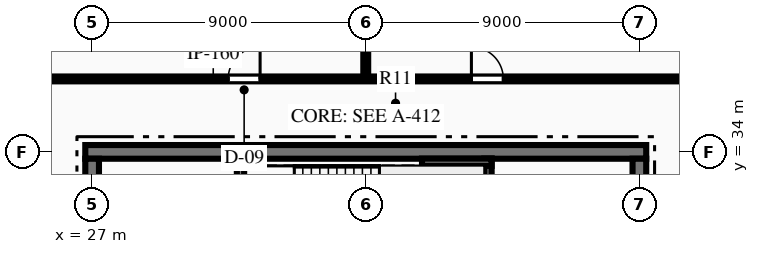
"""IFC4 building model, lengths in metres.
Left out: names, types, materials, properties, quantities, classifications, styles, units other than length and angle.
Written with IfcOpenShell. Run it as: python <this file> out.ifc"""

import sys

from ifc_helpers import new_model, si_unit, direction, frame, frame_2d, origin, place, context, subcontext, project, spatial, rectangle, extrude, element, fill, save


model = new_model("IFC4")
c1 = context("Model", 3, precision=1e-05, world=origin(), true_north=direction((0.0, 1.0)))
c2 = subcontext(c1, "Body", "Model", "MODEL_VIEW")
j1 = project(units=[si_unit("LENGTHUNIT", "METRE"), si_unit("PLANEANGLEUNIT", "RADIAN")], contexts=[c1])
p1 = place(None, origin())
s1 = spatial("IfcSite", under=j1, at=p1, CompositionType="ELEMENT")
p2 = place(p1, origin())
s2 = spatial("IfcBuilding", under=s1, at=p2, CompositionType="ELEMENT")
p3 = place(p2, frame((0.0, 0.0, 367.8)))
s3 = spatial("IfcBuildingStorey", under=s2, at=p3, CompositionType="ELEMENT", Elevation=367.8)
p4 = place(p3, frame((26.775, 34.0, 0.0), z_axis=(0.0, 0.0, 1.0), x_axis=(1.0, 0.0, 0.0)))
e1 = element("IfcWall", 1, at=p4, inside=s3, PredefinedType="SHEAR", context=c2, shape_type="SweptSolid", body=[
    extrude(rectangle(XDim=18.45, YDim=0.45, at=frame_2d((9.225, 0.0))), origin(), (0.0, 0.0, 1.0), 3.6),
])
p5 = place(p3, frame((27.0, 18.225, 0.0), z_axis=(0.0, 0.0, 1.0), x_axis=(0.0, 1.0, 0.0)))
e2 = element("IfcWall", 2, at=p5, inside=s3, PredefinedType="SHEAR", context=c2, shape_type="SweptSolid", body=[
    extrude(rectangle(XDim=15.55, YDim=0.45, at=frame_2d((7.775, 0.0))), origin(), (0.0, 0.0, 1.0), 3.6),
])
p6 = place(p5, frame((10.015, 0.0, 0.0)))
e3 = element("IfcOpeningElement", 3, at=p6, cuts=e2, PredefinedType="OPENING", context=c2, shape_type="SweptSolid", body=[
    extrude(rectangle(XDim=1.4, YDim=2.2, at=frame_2d((0.7, 1.1))), frame((0.0, 0.235, 0.0), z_axis=(0.0, -1.0, 0.0), x_axis=(1.0, 0.0, 0.0)), (0.0, 0.0, 1.0), 0.47),
])
p7 = place(p3, frame((45.0, 18.225, 0.0), z_axis=(0.0, 0.0, 1.0), x_axis=(0.0, 1.0, 0.0)))
e4 = element("IfcWall", 4, at=p7, inside=s3, PredefinedType="SHEAR", context=c2, shape_type="SweptSolid", body=[
    extrude(rectangle(XDim=15.55, YDim=0.45, at=frame_2d((7.775, 0.0))), origin(), (0.0, 0.0, 1.0), 3.6),
])
p8 = place(p7, frame((10.015, 0.0, 0.0)))
e5 = element("IfcOpeningElement", 5, at=p8, cuts=e4, PredefinedType="OPENING", context=c2, shape_type="SweptSolid", body=[
    extrude(rectangle(XDim=1.4, YDim=2.2, at=frame_2d((0.7, 1.1))), frame((0.0, 0.235, 0.0), z_axis=(0.0, -1.0, 0.0), x_axis=(1.0, 0.0, 0.0)), (0.0, 0.0, 1.0), 0.47),
])
p9 = place(p3, frame((31.88, 29.93, 0.0), z_axis=(0.0, 0.0, 1.0), x_axis=(0.0, 1.0, 0.0)))
e6 = element("IfcWall", 6, at=p9, inside=s3, PredefinedType="SHEAR", context=c2, shape_type="SweptSolid", body=[
    extrude(rectangle(XDim=3.79, YDim=0.24, at=frame_2d((1.895, 0.0))), origin(), (0.0, 0.0, 1.0), 3.6),
])
p10 = place(p3, frame((40.02, 29.93, 0.0), z_axis=(0.0, 0.0, 1.0), x_axis=(0.0, 1.0, 0.0)))
e7 = element("IfcWall", 7, at=p10, inside=s3, PredefinedType="SHEAR", context=c2, shape_type="SweptSolid", body=[
    extrude(rectangle(XDim=3.85, YDim=0.24, at=frame_2d((1.925, 0.0))), origin(), (0.0, 0.0, 1.0), 3.6),
])
p11 = place(p3, frame((37.85, 33.66, 0.0), z_axis=(0.0, 0.0, 1.0), x_axis=(1.0, 0.0, 0.0)))
e8 = element("IfcWall", 8, at=p11, inside=s3, PredefinedType="SHEAR", context=c2, shape_type="SweptSolid", body=[
    extrude(rectangle(XDim=2.29, YDim=0.24, at=frame_2d((1.145, 0.0))), origin(), (0.0, 0.0, 1.0), 3.6),
])
p12 = place(p3, frame((24.6, 36.4, 0.0), z_axis=(0.0, 0.0, 1.0), x_axis=(1.0, 0.0, 0.0)))
e9 = element("IfcWall", 9, at=p12, inside=s3, PredefinedType="PARTITIONING", context=c2, shape_type="SweptSolid", body=[
    extrude(rectangle(XDim=22.8, YDim=0.16, at=frame_2d((11.4, 0.0))), origin(), (0.0, 0.0, 1.0), 3.33),
])
p13 = place(p12, frame((6.875, 0.0, 0.0)))
e10 = element("IfcOpeningElement", 10, at=p13, cuts=e9, PredefinedType="OPENING", context=c2, shape_type="SweptSolid", body=[
    extrude(rectangle(XDim=1.05, YDim=2.15, at=frame_2d((0.525, 1.075))), frame((0.0, 0.09, 0.0), z_axis=(0.0, -1.0, 0.0), x_axis=(1.0, 0.0, 0.0)), (0.0, 0.0, 1.0), 0.18),
])
p14 = place(p12, frame((14.875, 0.0, 0.0)))
e11 = element("IfcOpeningElement", 11, at=p14, cuts=e9, PredefinedType="OPENING", context=c2, shape_type="SweptSolid", body=[
    extrude(rectangle(XDim=1.05, YDim=2.15, at=frame_2d((0.525, 1.075))), frame((0.0, 0.09, 0.0), z_axis=(0.0, -1.0, 0.0), x_axis=(1.0, 0.0, 0.0)), (0.0, 0.0, 1.0), 0.18),
])
p15 = place(p3, frame((36.0, 36.4, 0.0), z_axis=(0.0, 0.0, 1.0), x_axis=(0.0, 1.0, 0.0)))
e12 = element("IfcWall", 12, at=p15, inside=s3, PredefinedType="PARTITIONING", context=c2, shape_type="SweptSolid", body=[
    extrude(rectangle(XDim=11.22, YDim=0.16, at=frame_2d((5.61, 0.0))), origin(), (0.0, 0.0, 1.0), 3.33),
])
p16 = place(p13, origin())
e13 = element("IfcDoor", 13, at=p16, inside=s3, OperationType="SINGLE_SWING_RIGHT", PredefinedType="DOOR", context=c2, shape_type="SweptSolid", body=[
    extrude(rectangle(XDim=1.05, YDim=2.15, at=frame_2d((0.525, 1.075))), frame((0.0, 0.025, 0.0), z_axis=(0.0, -1.0, 0.0), x_axis=(1.0, 0.0, 0.0)), (0.0, 0.0, 1.0), 0.05),
])
fill(e10, e13)
p17 = place(p14, origin())
e14 = element("IfcDoor", 14, at=p17, inside=s3, OperationType="SINGLE_SWING_LEFT", PredefinedType="DOOR", context=c2, shape_type="SweptSolid", body=[
    extrude(rectangle(XDim=1.05, YDim=2.15, at=frame_2d((0.525, 1.075))), frame((0.0, 0.025, 0.0), z_axis=(0.0, -1.0, 0.0), x_axis=(1.0, 0.0, 0.0)), (0.0, 0.0, 1.0), 0.05),
])
fill(e11, e14)
save(model, sys.argv[1])
